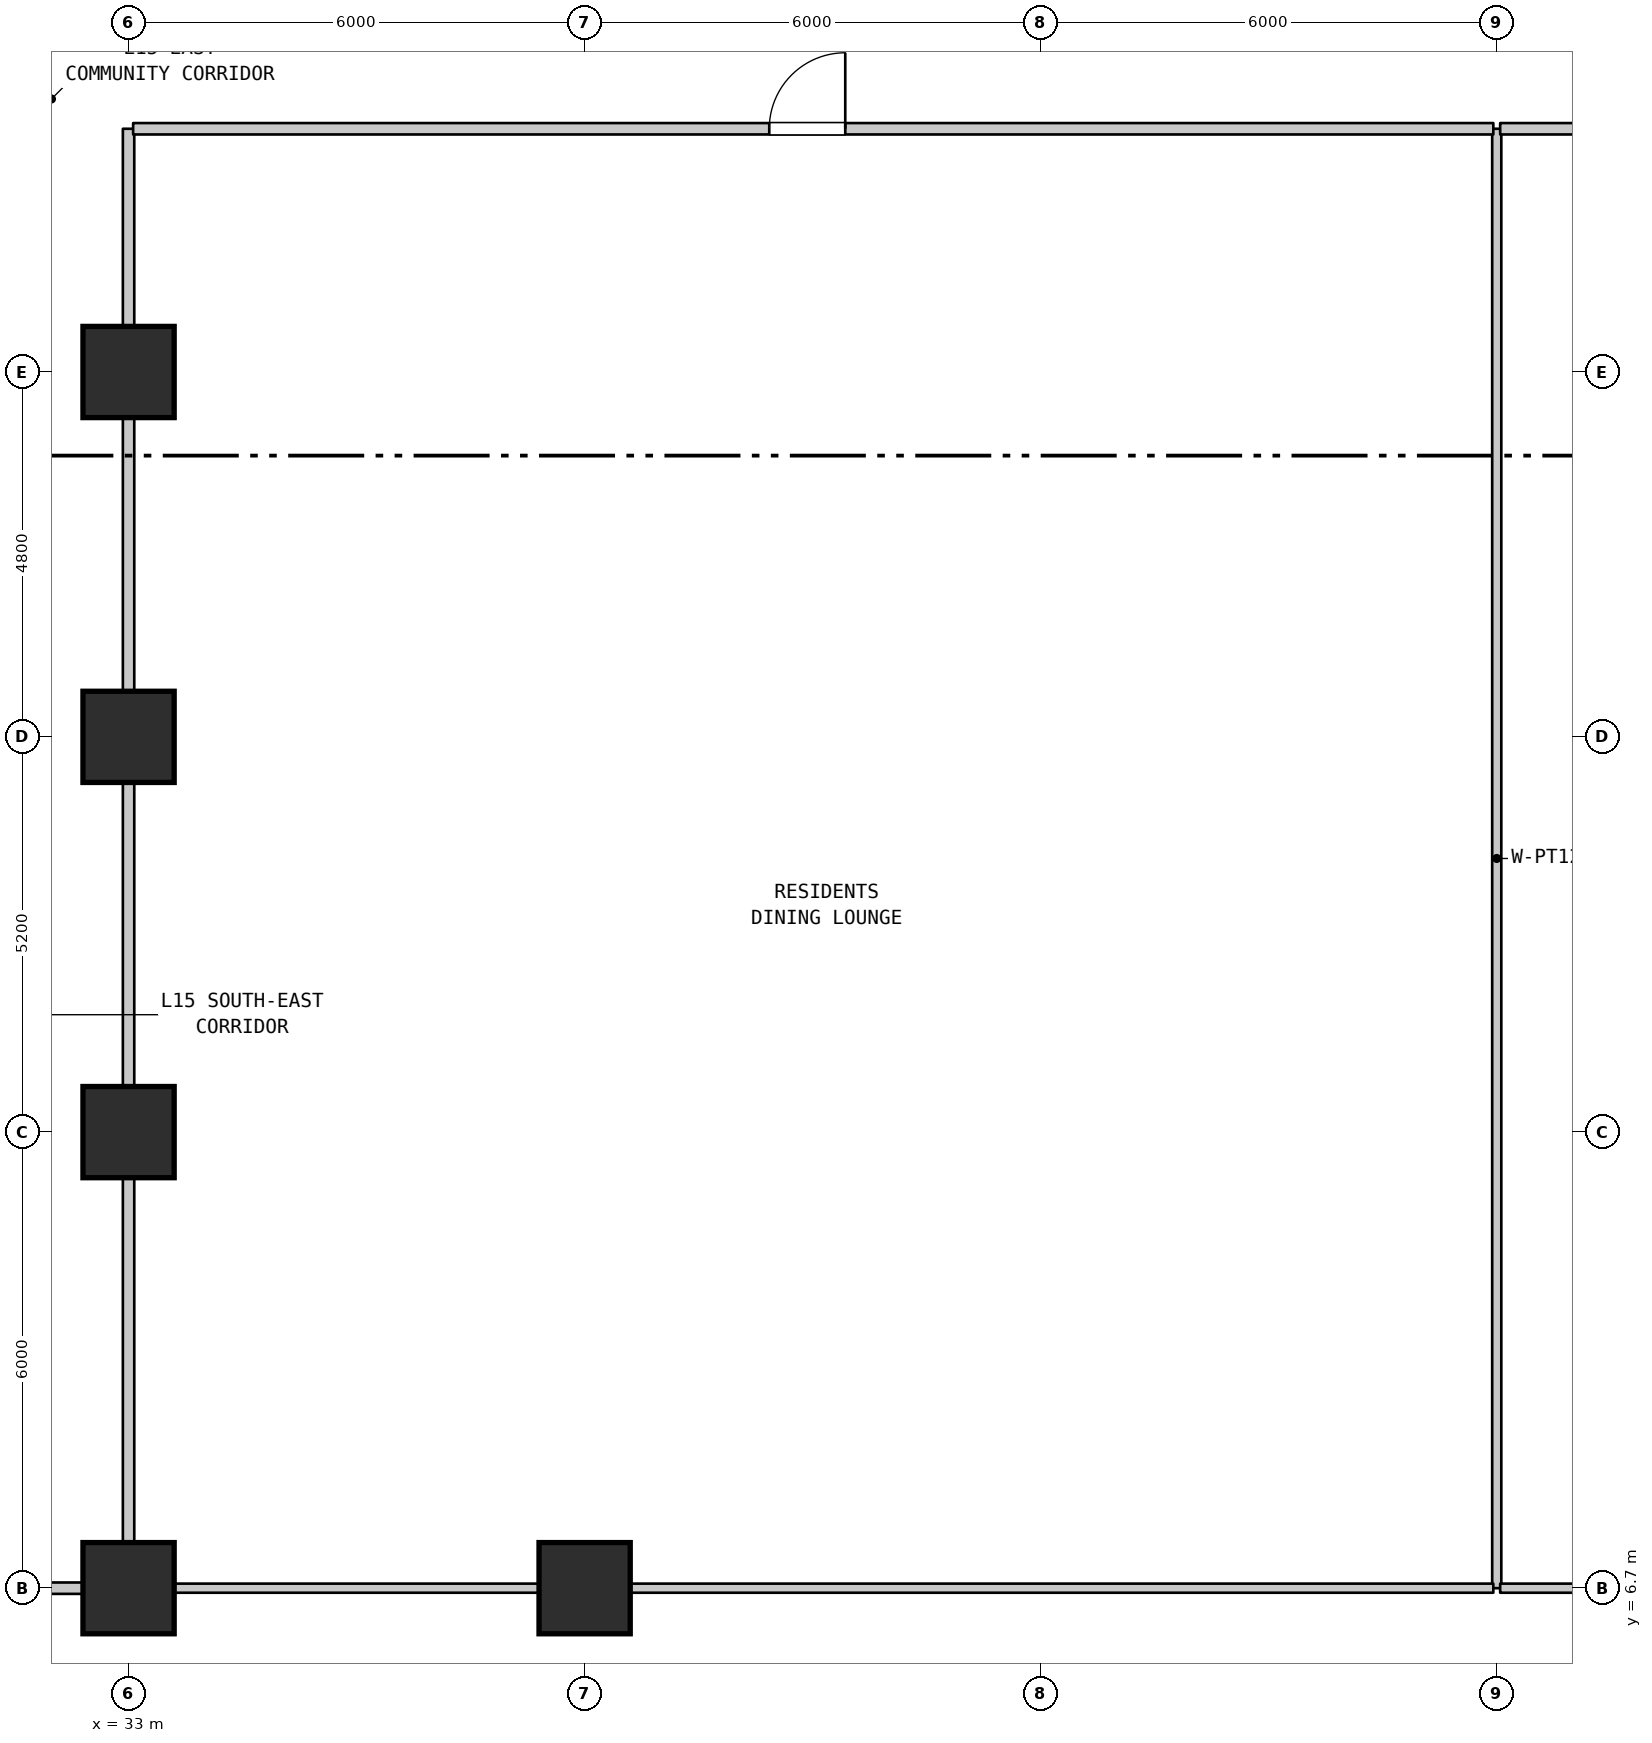
"""IFC4 building model, lengths in metres.
Left out: names, types, materials, properties, quantities, classifications, styles, units other than length and angle.
Written with IfcOpenShell. Run it as: python <this file> out.ifc"""

import sys

from ifc_helpers import new_model, si_unit, direction, frame, frame_2d, origin, origin_2d, place, context, subcontext, project, spatial, rectangle, extrude, element, fill, save


model = new_model("IFC4")
c1 = context("Model", 3, precision=1e-05, world=origin(), true_north=direction((0.0, 1.0)))
c2 = subcontext(c1, "Body", "Model", "MODEL_VIEW")
j1 = project(units=[si_unit("LENGTHUNIT", "METRE"), si_unit("PLANEANGLEUNIT", "RADIAN")], contexts=[c1])
p1 = place(None, origin())
s1 = spatial("IfcSite", under=j1, at=p1, CompositionType="ELEMENT")
p2 = place(p1, origin())
s2 = spatial("IfcBuilding", under=s1, at=p2, CompositionType="ELEMENT")
p3 = place(p2, frame((0.0, 0.0, 65.6)))
s3 = spatial("IfcBuildingStorey", under=s2, at=p3, CompositionType="ELEMENT", Elevation=65.6)
for number, where, z_axis, x_axis in (
    (1, (33.0, 6.7, 0.0), (0.0, 0.0, 1.0), (1.0, 0.0, 0.0)),
    (2, (33.0, 12.7, 0.0), (0.0, 0.0, 1.0), (1.0, 0.0, 0.0)),
    (3, (33.0, 17.9, 0.0), (0.0, 0.0, 1.0), (1.0, 0.0, 0.0)),
    (4, (33.0, 22.7, 0.0), (0.0, 0.0, 1.0), (1.0, 0.0, 0.0)),
    (5, (39.0, 6.7, 0.0), (0.0, 0.0, 1.0), (1.0, 0.0, 0.0)),
):
    element("IfcColumn", number, at=place(p3, frame(where, z_axis=z_axis, x_axis=x_axis)), inside=s3, PredefinedType="COLUMN", context=c2, shape_type="SweptSolid", body=[
        extrude(rectangle(XDim=1.2, YDim=1.2, at=origin_2d()), origin(), (0.0, 0.0, 1.0), 4.5),
    ])
p4 = place(p3, frame((33.0, 6.7, 0.0), z_axis=(0.0, 0.0, 1.0), x_axis=(0.0, 1.0, 0.0)))
e6 = element("IfcWall", 6, at=p4, inside=s3, PredefinedType="STANDARD", context=c2, shape_type="SweptSolid", body=[
    extrude(rectangle(XDim=19.2, YDim=0.15, at=frame_2d((9.6, 0.0))), origin(), (0.0, 0.0, 1.0), 3.685),
])
p5 = place(p3, frame((51.0, 6.7, 0.0), z_axis=(0.0, 0.0, 1.0), x_axis=(0.0, 1.0, 0.0)))
e7 = element("IfcWall", 7, at=p5, inside=s3, PredefinedType="PARTITIONING", context=c2, shape_type="SweptSolid", body=[
    extrude(rectangle(XDim=19.2, YDim=0.12, at=frame_2d((9.6, 0.0))), origin(), (0.0, 0.0, 1.0), 4.185),
])
p6 = place(p3, frame((21.01, 6.7, 0.0), z_axis=(0.0, 0.0, 1.0), x_axis=(1.0, 0.0, 0.0)))
e8 = element("IfcWall", 8, at=p6, inside=s3, PredefinedType="STANDARD", context=c2, shape_type="SweptSolid", body=[
    extrude(rectangle(XDim=11.93, YDim=0.15, at=frame_2d((5.965, 0.0))), origin(), (0.0, 0.0, 1.0), 3.685),
])
p7 = place(p6, frame((4.325, 0.0, 0.0)))
e9 = element("IfcOpeningElement", 9, at=p7, cuts=e8, PredefinedType="OPENING", context=c2, shape_type="SweptSolid", body=[
    extrude(rectangle(XDim=1.0, YDim=2.15, at=frame_2d((0.5, 1.075))), frame((0.0, 0.085, 0.0), z_axis=(0.0, -1.0, 0.0), x_axis=(1.0, 0.0, 0.0)), (0.0, 0.0, 1.0), 0.17),
])
p8 = place(p3, frame((33.06, 6.7, 0.0), z_axis=(0.0, 0.0, 1.0), x_axis=(1.0, 0.0, 0.0)))
e10 = element("IfcWall", 10, at=p8, inside=s3, PredefinedType="PARTITIONING", context=c2, shape_type="SweptSolid", body=[
    extrude(rectangle(XDim=5.94, YDim=0.12, at=frame_2d((2.97, 0.0))), origin(), (0.0, 0.0, 1.0), 3.685),
])
p9 = place(p3, frame((51.045, 6.7, 0.0), z_axis=(0.0, 0.0, 1.0), x_axis=(1.0, 0.0, 0.0)))
e11 = element("IfcWall", 11, at=p9, inside=s3, PredefinedType="PARTITIONING", context=c2, shape_type="SweptSolid", body=[
    extrude(rectangle(XDim=5.925, YDim=0.12, at=frame_2d((2.962, 0.0))), origin(), (0.0, 0.0, 1.0), 3.585),
])
p10 = place(p3, frame((33.06, 25.9, 0.0), z_axis=(0.0, 0.0, 1.0), x_axis=(1.0, 0.0, 0.0)))
e12 = element("IfcWall", 12, at=p10, inside=s3, PredefinedType="STANDARD", context=c2, shape_type="SweptSolid", body=[
    extrude(rectangle(XDim=17.895, YDim=0.15, at=frame_2d((8.948, 0.0))), origin(), (0.0, 0.0, 1.0), 4.185),
])
p11 = place(p10, frame((8.369, 0.0, 0.0)))
e13 = element("IfcOpeningElement", 13, at=p11, cuts=e12, PredefinedType="OPENING", context=c2, shape_type="SweptSolid", body=[
    extrude(rectangle(XDim=1.0, YDim=2.15, at=frame_2d((0.5, 1.075))), frame((0.0, 0.085, 0.0), z_axis=(0.0, -1.0, 0.0), x_axis=(1.0, 0.0, 0.0)), (0.0, 0.0, 1.0), 0.17),
])
p12 = place(p3, frame((51.045, 25.9, 0.0), z_axis=(0.0, 0.0, 1.0), x_axis=(1.0, 0.0, 0.0)))
e14 = element("IfcWall", 14, at=p12, inside=s3, PredefinedType="STANDARD", context=c2, shape_type="SweptSolid", body=[
    extrude(rectangle(XDim=5.955, YDim=0.15, at=frame_2d((2.978, 0.0))), origin(), (0.0, 0.0, 1.0), 4.185),
])
p13 = place(p12, frame((2.384, 0.0, 0.0)))
e15 = element("IfcOpeningElement", 15, at=p13, cuts=e14, PredefinedType="OPENING", context=c2, shape_type="SweptSolid", body=[
    extrude(rectangle(XDim=1.0, YDim=2.15, at=frame_2d((0.5, 1.075))), frame((0.0, 0.085, 0.0), z_axis=(0.0, -1.0, 0.0), x_axis=(1.0, 0.0, 0.0)), (0.0, 0.0, 1.0), 0.17),
])
p14 = place(p3, frame((39.0, 6.7, 0.0), z_axis=(0.0, 0.0, 1.0), x_axis=(1.0, 0.0, 0.0)))
e16 = element("IfcWall", 16, at=p14, inside=s3, PredefinedType="PARTITIONING", context=c2, shape_type="SweptSolid", body=[
    extrude(rectangle(XDim=11.955, YDim=0.12, at=frame_2d((5.978, 0.0))), origin(), (0.0, 0.0, 1.0), 3.585),
])
p15 = place(p11, origin())
e17 = element("IfcDoor", 17, at=p15, inside=s3, OperationType="SINGLE_SWING_RIGHT", PredefinedType="DOOR", context=c2, shape_type="SweptSolid", body=[
    extrude(rectangle(XDim=1.0, YDim=2.15, at=frame_2d((0.5, 1.075))), frame((0.0, 0.025, 0.0), z_axis=(0.0, -1.0, 0.0), x_axis=(1.0, 0.0, 0.0)), (0.0, 0.0, 1.0), 0.05),
])
fill(e13, e17)
save(model, sys.argv[1])
